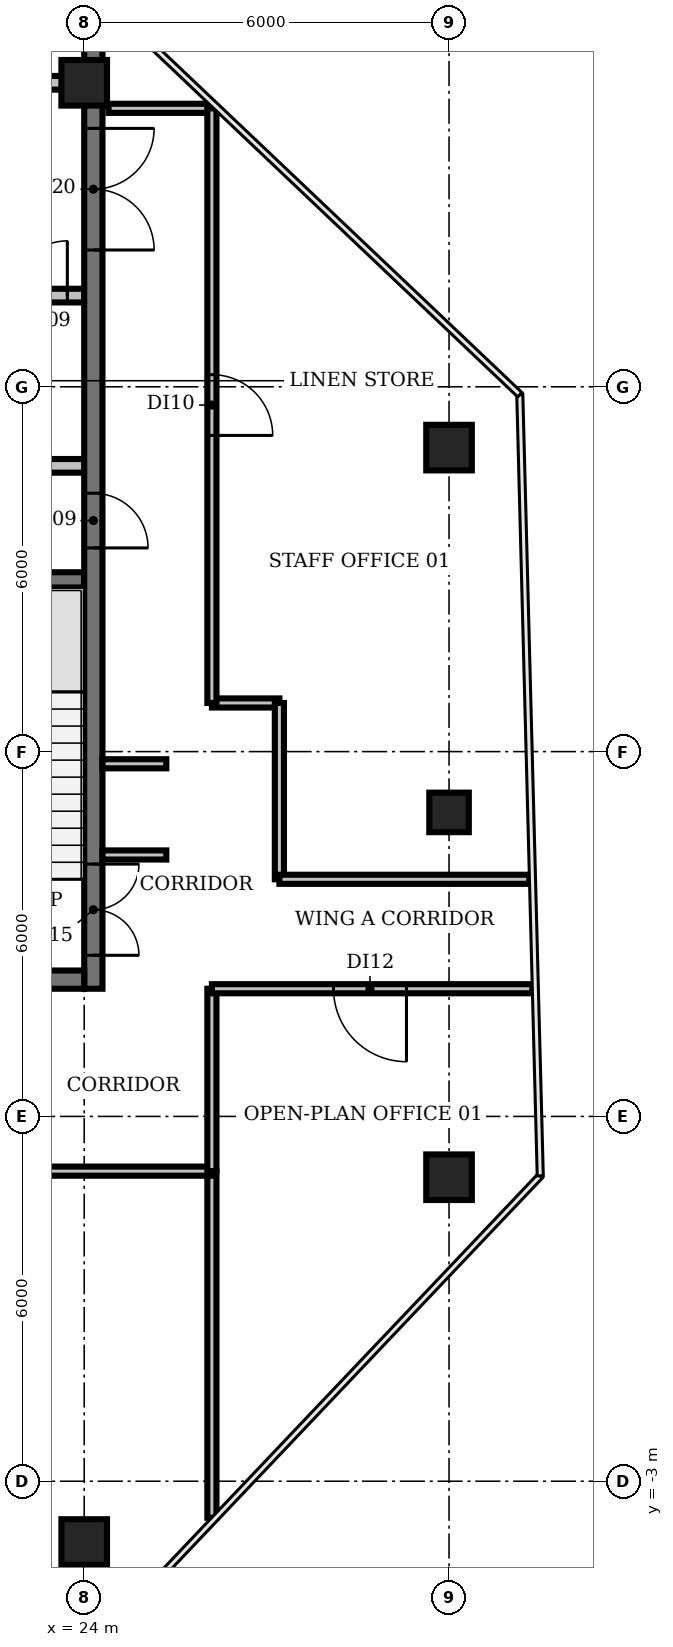
"""IFC4 building model, lengths in metres.
Left out: names, types, materials, properties, quantities, classifications, styles, units other than length and angle.
Written with IfcOpenShell. Run it as: python <this file> out.ifc"""

import sys

from ifc_helpers import new_model, si_unit, direction, frame, frame_2d, origin, origin_2d, place, context, subcontext, project, spatial, rectangle, circle, extrude, element, fill, save


model = new_model("IFC4")
c1 = context("Model", 3, precision=1e-05, world=origin(), true_north=direction((0.0, 1.0)))
c2 = subcontext(c1, "Body", "Model", "MODEL_VIEW")
j1 = project(units=[si_unit("LENGTHUNIT", "METRE"), si_unit("PLANEANGLEUNIT", "RADIAN")], contexts=[c1])
p1 = place(None, origin())
s1 = spatial("IfcSite", under=j1, at=p1, CompositionType="ELEMENT")
p2 = place(p1, origin())
s2 = spatial("IfcBuilding", under=s1, at=p2, CompositionType="ELEMENT")
p3 = place(p2, frame((0.0, 0.0, 327.2)))
s3 = spatial("IfcBuildingStorey", under=s2, at=p3, CompositionType="ELEMENT", Elevation=327.2)
for number, where, z_axis, x_axis in (
    (1, (24.0, -4.0, 0.0), (0.0, 0.0, 1.0), (1.0, 0.0, 0.0)),
    (2, (24.0, 20.0, 0.0), (0.0, 0.0, 1.0), (1.0, 0.0, 0.0)),
    (3, (30.0, 2.0, 0.0), (0.0, 0.0, 1.0), (1.0, 0.0, 0.0)),
):
    element("IfcColumn", number, at=place(p3, frame(where, z_axis=z_axis, x_axis=x_axis)), inside=s3, PredefinedType="COLUMN", context=c2, shape_type="SweptSolid", body=[
        extrude(circle(Radius=0.375, at=origin_2d()), origin(), (0.0, 0.0, 1.0), 3.9),
    ])
p4 = place(p3, frame((30.0, 8.0, 0.0), z_axis=(0.0, 0.0, 1.0), x_axis=(1.0, 0.0, 0.0)))
e4 = element("IfcColumn", 4, at=p4, inside=s3, PredefinedType="COLUMN", context=c2, shape_type="SweptSolid", body=[
    extrude(rectangle(XDim=0.65, YDim=0.65, at=origin_2d()), origin(), (0.0, 0.0, 1.0), 3.9),
])
p5 = place(p3, frame((30.0, 14.0, 0.0), z_axis=(0.0, 0.0, 1.0), x_axis=(1.0, 0.0, 0.0)))
e5 = element("IfcColumn", 5, at=p5, inside=s3, PredefinedType="COLUMN", context=c2, shape_type="SweptSolid", body=[
    extrude(circle(Radius=0.375, at=origin_2d()), origin(), (0.0, 0.0, 1.0), 3.9),
])
p6 = place(p3, frame((20.85, 11.825, 0.0), z_axis=(0.0, 0.0, 1.0), x_axis=(1.0, 0.0, 0.0)))
e6 = element("IfcWall", 6, at=p6, inside=s3, PredefinedType="SHEAR", context=c2, shape_type="SweptSolid", body=[
    extrude(rectangle(XDim=3.15, YDim=0.25, at=frame_2d((1.575, 0.0))), origin(), (0.0, 0.0, 1.0), 3.9),
])
p7 = place(p3, frame((16.6, 13.7, 0.0), z_axis=(0.0, 0.0, 1.0), x_axis=(1.0, 0.0, 0.0)))
e7 = element("IfcWall", 7, at=p7, inside=s3, PredefinedType="PARTITIONING", context=c2, shape_type="SweptSolid", body=[
    extrude(rectangle(XDim=7.4, YDim=0.225, at=frame_2d((3.7, 0.0))), origin(), (0.0, 0.0, 1.0), 3.9),
])
p8 = place(p3, frame((9.4, 16.5, 0.0), z_axis=(0.0, 0.0, 1.0), x_axis=(1.0, 0.0, 0.0)))
e8 = element("IfcWall", 8, at=p8, inside=s3, PredefinedType="PARTITIONING", context=c2, shape_type="SweptSolid", body=[
    extrude(rectangle(XDim=14.6, YDim=0.225, at=frame_2d((7.3, 0.0))), origin(), (0.0, 0.0, 1.0), 3.9),
])
p9 = place(p8, frame((1.9, 0.0, 0.0)))
e9 = element("IfcOpeningElement", 9, at=p9, cuts=e8, PredefinedType="OPENING", context=c2, shape_type="SweptSolid", body=[
    extrude(rectangle(XDim=1.0, YDim=2.1, at=frame_2d((0.5, 1.05))), frame((0.0, 0.123, 0.0), z_axis=(0.0, -1.0, 0.0), x_axis=(1.0, 0.0, 0.0)), (0.0, 0.0, 1.0), 0.245),
])
p10 = place(p8, frame((7.475, 0.0, 0.0)))
e10 = element("IfcOpeningElement", 10, at=p10, cuts=e8, PredefinedType="OPENING", context=c2, shape_type="SweptSolid", body=[
    extrude(rectangle(XDim=1.0, YDim=2.1, at=frame_2d((0.5, 1.05))), frame((0.0, 0.123, 0.0), z_axis=(0.0, -1.0, 0.0), x_axis=(1.0, 0.0, 0.0)), (0.0, 0.0, 1.0), 0.245),
])
p11 = place(p8, frame((11.647, 0.0, 0.0)))
e11 = element("IfcOpeningElement", 11, at=p11, cuts=e8, PredefinedType="OPENING", context=c2, shape_type="SweptSolid", body=[
    extrude(rectangle(XDim=0.9, YDim=2.1, at=frame_2d((0.45, 1.05))), frame((0.0, 0.123, 0.0), z_axis=(0.0, -1.0, 0.0), x_axis=(1.0, 0.0, 0.0)), (0.0, 0.0, 1.0), 0.245),
])
p12 = place(p8, frame((13.423, 0.0, 0.0)))
e12 = element("IfcOpeningElement", 12, at=p12, cuts=e8, PredefinedType="OPENING", context=c2, shape_type="SweptSolid", body=[
    extrude(rectangle(XDim=0.9, YDim=2.1, at=frame_2d((0.45, 1.05))), frame((0.0, 0.123, 0.0), z_axis=(0.0, -1.0, 0.0), x_axis=(1.0, 0.0, 0.0)), (0.0, 0.0, 1.0), 0.245),
])
p13 = place(p3, frame((24.0, 20.0, 0.0), z_axis=(0.0, 0.0, 1.0), x_axis=(-1.0, 0.0, 0.0)))
e13 = element("IfcWall", 13, at=p13, inside=s3, PredefinedType="PARTITIONING", context=c2, shape_type="SweptSolid", body=[
    extrude(rectangle(XDim=14.6, YDim=0.225, at=frame_2d((7.3, 0.0))), origin(), (0.0, 0.0, 1.0), 3.9),
])
p14 = place(p13, frame((12.75, 0.0, 0.0)))
e14 = element("IfcOpeningElement", 14, at=p14, cuts=e13, PredefinedType="OPENING", context=c2, shape_type="SweptSolid", body=[
    extrude(rectangle(XDim=1.1, YDim=2.1, at=frame_2d((0.55, 1.05))), frame((0.0, 0.123, 0.0), z_axis=(0.0, -1.0, 0.0), x_axis=(1.0, 0.0, 0.0)), (0.0, 0.0, 1.0), 0.245),
])
p15 = place(p13, frame((9.95, 0.0, 0.0)))
e15 = element("IfcOpeningElement", 15, at=p15, cuts=e13, PredefinedType="OPENING", context=c2, shape_type="SweptSolid", body=[
    extrude(rectangle(XDim=1.1, YDim=2.1, at=frame_2d((0.55, 1.05))), frame((0.0, 0.123, 0.0), z_axis=(0.0, -1.0, 0.0), x_axis=(1.0, 0.0, 0.0)), (0.0, 0.0, 1.0), 0.245),
])
p16 = place(p13, frame((7.15, 0.0, 0.0)))
e16 = element("IfcOpeningElement", 16, at=p16, cuts=e13, PredefinedType="OPENING", context=c2, shape_type="SweptSolid", body=[
    extrude(rectangle(XDim=1.1, YDim=2.1, at=frame_2d((0.55, 1.05))), frame((0.0, 0.123, 0.0), z_axis=(0.0, -1.0, 0.0), x_axis=(1.0, 0.0, 0.0)), (0.0, 0.0, 1.0), 0.245),
])
p17 = place(p13, frame((4.35, 0.0, 0.0)))
e17 = element("IfcOpeningElement", 17, at=p17, cuts=e13, PredefinedType="OPENING", context=c2, shape_type="SweptSolid", body=[
    extrude(rectangle(XDim=1.1, YDim=2.1, at=frame_2d((0.55, 1.05))), frame((0.0, 0.123, 0.0), z_axis=(0.0, -1.0, 0.0), x_axis=(1.0, 0.0, 0.0)), (0.0, 0.0, 1.0), 0.245),
])
p18 = place(p13, frame((2.137, 0.0, 0.0)))
e18 = element("IfcOpeningElement", 18, at=p18, cuts=e13, PredefinedType="OPENING", context=c2, shape_type="SweptSolid", body=[
    extrude(rectangle(XDim=0.9, YDim=2.1, at=frame_2d((0.45, 1.05))), frame((0.0, 0.123, 0.0), z_axis=(0.0, -1.0, 0.0), x_axis=(1.0, 0.0, 0.0)), (0.0, 0.0, 1.0), 0.245),
])
p19 = place(p13, frame((0.562, 0.0, 0.0)))
e19 = element("IfcOpeningElement", 19, at=p19, cuts=e13, PredefinedType="OPENING", context=c2, shape_type="SweptSolid", body=[
    extrude(rectangle(XDim=0.9, YDim=2.1, at=frame_2d((0.45, 1.05))), frame((0.0, 0.123, 0.0), z_axis=(0.0, -1.0, 0.0), x_axis=(1.0, 0.0, 0.0)), (0.0, 0.0, 1.0), 0.245),
])
p20 = place(p3, frame((24.15, 25.705, 0.0), z_axis=(0.0, 0.0, 1.0), x_axis=(0.0, -1.0, 0.0)))
e20 = element("IfcWall", 20, at=p20, inside=s3, PredefinedType="SHEAR", context=c2, shape_type="SweptSolid", body=[
    extrude(rectangle(XDim=20.605, YDim=0.3, at=frame_2d((10.302, 0.0))), origin(), (0.0, 0.0, 1.0), 3.9),
])
p21 = place(p20, frame((18.555, 0.0, 0.0)))
e21 = element("IfcOpeningElement", 21, at=p21, cuts=e20, PredefinedType="OPENING", context=c2, shape_type="SweptSolid", body=[
    extrude(rectangle(XDim=1.5, YDim=2.1, at=frame_2d((0.75, 1.05))), frame((0.0, 0.16, 0.0), z_axis=(0.0, -1.0, 0.0), x_axis=(1.0, 0.0, 0.0)), (0.0, 0.0, 1.0), 0.32),
])
p22 = place(p20, frame((12.455, 0.0, 0.0)))
e22 = element("IfcOpeningElement", 22, at=p22, cuts=e20, PredefinedType="OPENING", context=c2, shape_type="SweptSolid", body=[
    extrude(rectangle(XDim=0.9, YDim=2.1, at=frame_2d((0.45, 1.05))), frame((0.0, 0.16, 0.0), z_axis=(0.0, -1.0, 0.0), x_axis=(1.0, 0.0, 0.0)), (0.0, 0.0, 1.0), 0.32),
])
p23 = place(p20, frame((6.455, 0.0, 0.0)))
e23 = element("IfcOpeningElement", 23, at=p23, cuts=e20, PredefinedType="OPENING", context=c2, shape_type="SweptSolid", body=[
    extrude(rectangle(XDim=2.0, YDim=2.1, at=frame_2d((1.0, 1.05))), frame((0.0, 0.16, 0.0), z_axis=(0.0, -1.0, 0.0), x_axis=(1.0, 0.0, 0.0)), (0.0, 0.0, 1.0), 0.32),
])
p24 = place(p3, frame((24.0, 5.25, 0.0), z_axis=(0.0, 0.0, 1.0), x_axis=(-1.0, 0.0, 0.0)))
e24 = element("IfcWall", 24, at=p24, inside=s3, PredefinedType="SHEAR", context=c2, shape_type="SweptSolid", body=[
    extrude(rectangle(XDim=18.0, YDim=0.3, at=frame_2d((9.0, 0.0))), origin(), (0.0, 0.0, 1.0), 3.9),
])
p25 = place(p24, frame((13.0, 0.0, 0.0)))
e25 = element("IfcOpeningElement", 25, at=p25, cuts=e24, PredefinedType="OPENING", context=c2, shape_type="SweptSolid", body=[
    extrude(rectangle(XDim=1.2, YDim=2.1, at=frame_2d((0.6, 1.05))), frame((0.0, 0.16, 0.0), z_axis=(0.0, -1.0, 0.0), x_axis=(1.0, 0.0, 0.0)), (0.0, 0.0, 1.0), 0.32),
])
p26 = place(p24, frame((4.9, 0.0, 0.0)))
e26 = element("IfcOpeningElement", 26, at=p26, cuts=e24, PredefinedType="OPENING", context=c2, shape_type="SweptSolid", body=[
    extrude(rectangle(XDim=1.0, YDim=2.1, at=frame_2d((0.5, 1.05))), frame((0.0, 0.16, 0.0), z_axis=(0.0, -1.0, 0.0), x_axis=(1.0, 0.0, 0.0)), (0.0, 0.0, 1.0), 0.32),
])
for number, where, z_axis, x_axis in (
    (27, (24.3, 7.3, 0.0), (0.0, 0.0, 1.0), (1.0, 0.0, 0.0)),
    (28, (24.3, 8.8, 0.0), (0.0, 0.0, 1.0), (1.0, 0.0, 0.0)),
):
    element("IfcWall", number, at=place(p3, frame(where, z_axis=z_axis, x_axis=x_axis)), inside=s3, PredefinedType="PARTITIONING", context=c2, shape_type="SweptSolid", body=[
        extrude(rectangle(XDim=1.05, YDim=0.15, at=frame_2d((0.525, 0.0))), origin(), (0.0, 0.0, 1.0), 2.95),
    ])
p27 = place(p3, frame((24.4, 19.58, 0.0), z_axis=(0.0, 0.0, 1.0), x_axis=(1.0, 0.0, 0.0)))
e29 = element("IfcWall", 29, at=p27, inside=s3, PredefinedType="PARTITIONING", context=c2, shape_type="SweptSolid", body=[
    extrude(rectangle(XDim=1.7, YDim=0.15, at=frame_2d((0.85, 0.0))), origin(), (0.0, 0.0, 1.0), 2.95),
])
p28 = place(p3, frame((26.1, -3.6, 0.0), z_axis=(0.0, 0.0, 1.0), x_axis=(0.0, 1.0, 0.0)))
e30 = element("IfcWall", 30, at=p28, inside=s3, PredefinedType="PARTITIONING", context=c2, shape_type="SweptSolid", body=[
    extrude(rectangle(XDim=5.7, YDim=0.15, at=frame_2d((2.85, 0.0))), origin(), (0.0, 0.0, 1.0), 2.95),
])
p29 = place(p3, frame((26.1, 2.1, 0.0), z_axis=(0.0, 0.0, 1.0), x_axis=(-1.0, 0.0, 0.0)))
e31 = element("IfcWall", 31, at=p29, inside=s3, PredefinedType="PARTITIONING", context=c2, shape_type="SweptSolid", body=[
    extrude(rectangle(XDim=22.2, YDim=0.15, at=frame_2d((11.1, 0.0))), origin(), (0.0, 0.0, 1.0), 2.95),
])
p30 = place(p29, frame((10.6, 0.0, 0.0)))
e32 = element("IfcOpeningElement", 32, at=p30, cuts=e31, PredefinedType="OPENING", context=c2, shape_type="SweptSolid", body=[
    extrude(rectangle(XDim=1.2, YDim=2.1, at=frame_2d((0.6, 1.05))), frame((0.0, 0.085, 0.0), z_axis=(0.0, -1.0, 0.0), x_axis=(1.0, 0.0, 0.0)), (0.0, 0.0, 1.0), 0.17),
])
p31 = place(p3, frame((26.1, 2.1, 0.0), z_axis=(0.0, 0.0, 1.0), x_axis=(0.0, 1.0, 0.0)))
e33 = element("IfcWall", 33, at=p31, inside=s3, PredefinedType="PARTITIONING", context=c2, shape_type="SweptSolid", body=[
    extrude(rectangle(XDim=3.0, YDim=0.15, at=frame_2d((1.5, 0.0))), origin(), (0.0, 0.0, 1.0), 2.95),
])
p32 = place(p3, frame((26.1, 9.8, 0.0), z_axis=(0.0, 0.0, 1.0), x_axis=(1.0, 0.0, 0.0)))
e34 = element("IfcWall", 34, at=p32, inside=s3, PredefinedType="PARTITIONING", context=c2, shape_type="SweptSolid", body=[
    extrude(rectangle(XDim=1.11, YDim=0.15, at=frame_2d((0.555, 0.0))), origin(), (0.0, 0.0, 1.0), 2.95),
])
p33 = place(p3, frame((26.1, 19.58, 0.0), z_axis=(0.0, 0.0, 1.0), x_axis=(0.0, -1.0, 0.0)))
e35 = element("IfcWall", 35, at=p33, inside=s3, PredefinedType="PARTITIONING", context=c2, shape_type="SweptSolid", body=[
    extrude(rectangle(XDim=9.78, YDim=0.15, at=frame_2d((4.89, 0.0))), origin(), (0.0, 0.0, 1.0), 2.95),
])
p34 = place(p33, frame((4.38, 0.0, 0.0)))
e36 = element("IfcOpeningElement", 36, at=p34, cuts=e35, PredefinedType="OPENING", context=c2, shape_type="SweptSolid", body=[
    extrude(rectangle(XDim=1.0, YDim=2.1, at=frame_2d((0.5, 1.05))), frame((0.0, 0.085, 0.0), z_axis=(0.0, -1.0, 0.0), x_axis=(1.0, 0.0, 0.0)), (0.0, 0.0, 1.0), 0.17),
])
p35 = place(p3, frame((27.21, 6.9, 0.0), z_axis=(0.0, 0.0, 1.0), x_axis=(0.0, 1.0, 0.0)))
e37 = element("IfcWall", 37, at=p35, inside=s3, PredefinedType="PARTITIONING", context=c2, shape_type="SweptSolid", body=[
    extrude(rectangle(XDim=2.9, YDim=0.15, at=frame_2d((1.45, 0.0))), origin(), (0.0, 0.0, 1.0), 2.95),
])
p36 = place(p3, frame((27.21, 6.9, 0.0), z_axis=(0.0, 0.0, 1.0), x_axis=(1.0, 0.0, 0.0)))
e38 = element("IfcWall", 38, at=p36, inside=s3, PredefinedType="PARTITIONING", context=c2, shape_type="SweptSolid", body=[
    extrude(rectangle(XDim=4.11, YDim=0.15, at=frame_2d((2.055, 0.0))), origin(), (0.0, 0.0, 1.0), 2.95),
])
p37 = place(p3, frame((31.37, 5.1, 0.0), z_axis=(0.0, 0.0, 1.0), x_axis=(-1.0, 0.0, 0.0)))
e39 = element("IfcWall", 39, at=p37, inside=s3, PredefinedType="PARTITIONING", context=c2, shape_type="SweptSolid", body=[
    extrude(rectangle(XDim=5.27, YDim=0.15, at=frame_2d((2.635, 0.0))), origin(), (0.0, 0.0, 1.0), 2.95),
])
p38 = place(p37, frame((2.07, 0.0, 0.0)))
e40 = element("IfcOpeningElement", 40, at=p38, cuts=e39, PredefinedType="OPENING", context=c2, shape_type="SweptSolid", body=[
    extrude(rectangle(XDim=1.2, YDim=2.1, at=frame_2d((0.6, 1.05))), frame((0.0, 0.085, 0.0), z_axis=(0.0, -1.0, 0.0), x_axis=(1.0, 0.0, 0.0)), (0.0, 0.0, 1.0), 0.17),
])
p39 = place(p12, origin())
e41 = element("IfcDoor", 41, at=p39, inside=s3, OperationType="SINGLE_SWING_RIGHT", PredefinedType="DOOR", context=c2, shape_type="SweptSolid", body=[
    extrude(rectangle(XDim=0.9, YDim=2.1, at=frame_2d((0.45, 1.05))), frame((0.0, 0.025, 0.0), z_axis=(0.0, -1.0, 0.0), x_axis=(1.0, 0.0, 0.0)), (0.0, 0.0, 1.0), 0.05),
])
fill(e12, e41)
p40 = place(p21, origin())
e42 = element("IfcDoor", 42, at=p40, inside=s3, OperationType="DOUBLE_DOOR_SINGLE_SWING", PredefinedType="DOOR", context=c2, shape_type="SweptSolid", body=[
    extrude(rectangle(XDim=1.5, YDim=2.1, at=frame_2d((0.75, 1.05))), frame((0.0, 0.025, 0.0), z_axis=(0.0, -1.0, 0.0), x_axis=(1.0, 0.0, 0.0)), (0.0, 0.0, 1.0), 0.05),
])
fill(e21, e42)
p41 = place(p22, origin())
e43 = element("IfcDoor", 43, at=p41, inside=s3, OperationType="SINGLE_SWING_RIGHT", PredefinedType="DOOR", context=c2, shape_type="SweptSolid", body=[
    extrude(rectangle(XDim=0.9, YDim=2.1, at=frame_2d((0.45, 1.05))), frame((0.0, 0.025, 0.0), z_axis=(0.0, -1.0, 0.0), x_axis=(1.0, 0.0, 0.0)), (0.0, 0.0, 1.0), 0.05),
])
fill(e22, e43)
p42 = place(p23, origin())
e44 = element("IfcDoor", 44, at=p42, inside=s3, OperationType="DOUBLE_DOOR_SINGLE_SWING", PredefinedType="DOOR", context=c2, shape_type="SweptSolid", body=[
    extrude(rectangle(XDim=2.0, YDim=2.1, at=frame_2d((1.0, 1.05))), frame((0.0, 0.025, 0.0), z_axis=(0.0, -1.0, 0.0), x_axis=(1.0, 0.0, 0.0)), (0.0, 0.0, 1.0), 0.05),
])
fill(e23, e44)
p43 = place(p34, origin())
e45 = element("IfcDoor", 45, at=p43, inside=s3, OperationType="SINGLE_SWING_RIGHT", PredefinedType="DOOR", context=c2, shape_type="SweptSolid", body=[
    extrude(rectangle(XDim=1.0, YDim=2.1, at=frame_2d((0.5, 1.05))), frame((0.0, 0.025, 0.0), z_axis=(0.0, -1.0, 0.0), x_axis=(1.0, 0.0, 0.0)), (0.0, 0.0, 1.0), 0.05),
])
fill(e36, e45)
p44 = place(p38, origin())
e46 = element("IfcDoor", 46, at=p44, inside=s3, OperationType="SINGLE_SWING_LEFT", PredefinedType="DOOR", context=c2, shape_type="SweptSolid", body=[
    extrude(rectangle(XDim=1.2, YDim=2.1, at=frame_2d((0.6, 1.05))), frame((0.0, 0.025, 0.0), z_axis=(0.0, -1.0, 0.0), x_axis=(1.0, 0.0, 0.0)), (0.0, 0.0, 1.0), 0.05),
])
fill(e40, e46)
save(model, sys.argv[1])
